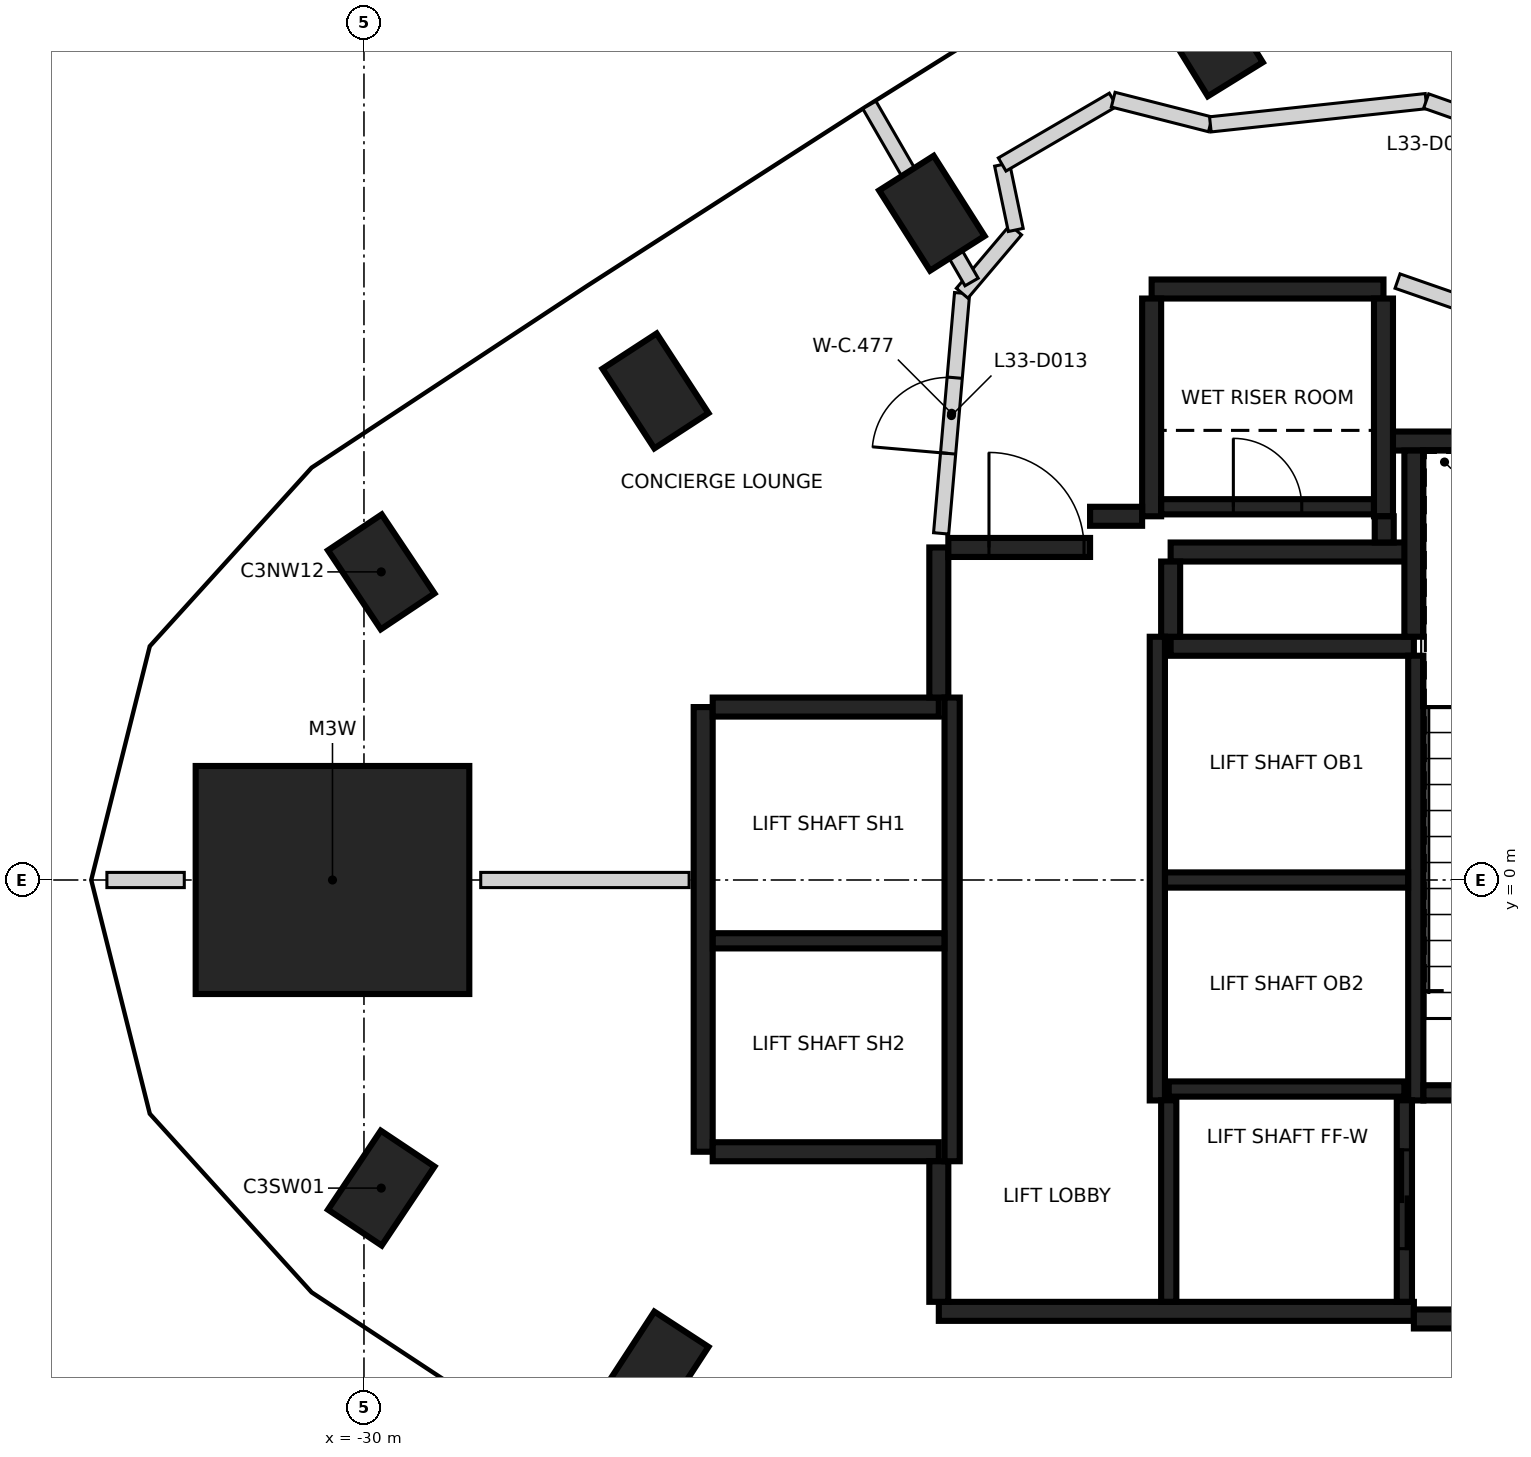
"""IFC4 building model, lengths in metres.
Left out: names, types, materials, properties, quantities, classifications, styles, units other than length and angle.
Written with IfcOpenShell. Run it as: python <this file> out.ifc"""

import sys

from ifc_helpers import new_model, si_unit, direction, frame, frame_2d, origin, origin_2d, place, context, subcontext, project, spatial, rectangle, extrude, element, fill, save


model = new_model("IFC4")
c1 = context("Model", 3, precision=1e-05, world=origin(), true_north=direction((0.0, 1.0)))
c2 = subcontext(c1, "Body", "Model", "MODEL_VIEW")
j1 = project(units=[si_unit("LENGTHUNIT", "METRE"), si_unit("PLANEANGLEUNIT", "RADIAN")], contexts=[c1])
p1 = place(None, origin())
s1 = spatial("IfcSite", under=j1, at=p1, CompositionType="ELEMENT")
p2 = place(p1, origin())
s2 = spatial("IfcBuilding", under=s1, at=p2, CompositionType="ELEMENT")
p3 = place(p2, frame((0.0, 0.0, 136.0)))
s3 = spatial("IfcBuildingStorey", under=s2, at=p3, CompositionType="ELEMENT", Elevation=136.0)
for number, where, z_axis, x_axis in (
    (1, (-18.865, 11.066, -0.4), (0.0, 0.0, 1.0), (-0.526, 0.851, 0.0)),
    (2, (-22.529, 8.772, -0.4), (0.0, 0.0, 1.0), (-0.536, 0.844, 0.0)),
    (3, (-26.165, 6.434, -0.4), (0.0, 0.0, 1.0), (-0.546, 0.838, 0.0)),
    (4, (-29.773, 4.053, -0.4), (0.0, 0.0, 1.0), (-0.556, 0.831, 0.0)),
    (5, (-29.773, -4.053, -0.4), (0.0, 0.0, 1.0), (0.556, 0.831, 0.0)),
    (6, (-26.165, -6.434, -0.4), (0.0, 0.0, 1.0), (0.546, 0.838, 0.0)),
):
    element("IfcColumn", number, at=place(p3, frame(where, z_axis=z_axis, x_axis=x_axis)), inside=s3, PredefinedType="COLUMN", context=c2, shape_type="SweptSolid", body=[
        extrude(rectangle(XDim=1.25, YDim=0.85, at=origin_2d()), origin(), (0.0, 0.0, 1.0), 3.6),
    ])
p4 = place(p3, frame((-30.414, 0.0, -0.4), z_axis=(0.0, 0.0, 1.0), x_axis=(1.0, 0.0, 0.0)))
e7 = element("IfcColumn", 7, at=p4, inside=s3, PredefinedType="COLUMN", context=c2, shape_type="SweptSolid", body=[
    extrude(rectangle(XDim=3.6, YDim=3.0, at=origin_2d()), origin(), (0.0, 0.0, 1.0), 3.6),
])
p5 = place(p3, frame((-16.187, -5.675, 0.0), z_axis=(0.0, 0.0, 1.0), x_axis=(-1.0, 0.0, 0.0)))
e8 = element("IfcWall", 8, at=p5, inside=s3, PredefinedType="SHEAR", context=c2, shape_type="SweptSolid", body=[
    extrude(rectangle(XDim=6.25, YDim=0.25, at=frame_2d((3.125, 0.0))), origin(), (0.0, 0.0, 1.0), 3.2),
])
p6 = place(p3, frame((-25.537, -3.575, 0.0), z_axis=(0.0, 0.0, 1.0), x_axis=(0.0, 1.0, 0.0)))
e9 = element("IfcWall", 9, at=p6, inside=s3, PredefinedType="SHEAR", context=c2, shape_type="SweptSolid", body=[
    extrude(rectangle(XDim=5.85, YDim=0.25, at=frame_2d((2.925, 0.0))), origin(), (0.0, 0.0, 1.0), 3.2),
])
p7 = place(p3, frame((-10.963, -5.775, 0.0), z_axis=(0.0, 0.0, 1.0), x_axis=(-1.0, 0.0, 0.0)))
e10 = element("IfcWall", 10, at=p7, inside=s3, PredefinedType="SHEAR", context=c2, shape_type="SweptSolid", body=[
    extrude(rectangle(XDim=5.225, YDim=0.25, at=frame_2d((2.612, 0.0))), origin(), (0.0, 0.0, 1.0), 3.2),
])
p8 = place(p3, frame((-16.472, 5.775, 0.0), z_axis=(0.0, 0.0, 1.0), x_axis=(1.0, 0.0, 0.0)))
e11 = element("IfcWall", 11, at=p8, inside=s3, PredefinedType="SHEAR", context=c2, shape_type="SweptSolid", body=[
    extrude(rectangle(XDim=5.51, YDim=0.25, at=frame_2d((2.755, 0.0))), origin(), (0.0, 0.0, 1.0), 3.2),
])
p9 = place(p3, frame((-19.387, 3.075, 0.0), z_axis=(0.0, 0.0, 1.0), x_axis=(1.0, 0.0, 0.0)))
e12 = element("IfcWall", 12, at=p9, inside=s3, PredefinedType="SHEAR", context=c2, shape_type="SweptSolid", body=[
    extrude(rectangle(XDim=3.2, YDim=0.25, at=frame_2d((1.6, 0.0))), origin(), (0.0, 0.0, 1.0), 3.2),
])
for number, where, z_axis, x_axis in (
    (13, (-22.437, -3.575, 0.0), (0.0, 0.0, 1.0), (-1.0, 0.0, 0.0)),
    (14, (-25.412, 2.275, 0.0), (0.0, 0.0, 1.0), (1.0, 0.0, 0.0)),
):
    element("IfcWall", number, at=place(p3, frame(where, z_axis=z_axis, x_axis=x_axis)), inside=s3, PredefinedType="SHEAR", context=c2, shape_type="SweptSolid", body=[
        extrude(rectangle(XDim=2.975, YDim=0.25, at=frame_2d((1.487, 0.0))), origin(), (0.0, 0.0, 1.0), 3.2),
    ])
p10 = place(p3, frame((-19.637, 7.775, 0.0), z_axis=(0.0, 0.0, 1.0), x_axis=(1.0, 0.0, 0.0)))
e15 = element("IfcWall", 15, at=p10, inside=s3, PredefinedType="SHEAR", context=c2, shape_type="SweptSolid", body=[
    extrude(rectangle(XDim=3.05, YDim=0.25, at=frame_2d((1.525, 0.0))), origin(), (0.0, 0.0, 1.0), 3.2),
])
for number, where, z_axis, x_axis in (
    (16, (-16.587, 7.65, 0.0), (0.0, 0.0, 1.0), (0.0, -1.0, 0.0)),
    (17, (-19.637, 4.785, 0.0), (0.0, 0.0, 1.0), (0.0, 1.0, 0.0)),
):
    element("IfcWall", number, at=place(p3, frame(where, z_axis=z_axis, x_axis=x_axis)), inside=s3, PredefinedType="SHEAR", context=c2, shape_type="SweptSolid", body=[
        extrude(rectangle(XDim=2.865, YDim=0.25, at=frame_2d((1.432, 0.0))), origin(), (0.0, 0.0, 1.0), 3.2),
    ])
p11 = place(p3, frame((-16.302, 4.315, 0.0), z_axis=(0.0, 0.0, 1.0), x_axis=(-1.0, 0.0, 0.0)))
e18 = element("IfcWall", 18, at=p11, inside=s3, PredefinedType="SHEAR", context=c2, shape_type="SweptSolid", body=[
    extrude(rectangle(XDim=3.085, YDim=0.25, at=frame_2d((1.542, 0.0))), origin(), (0.0, 0.0, 1.0), 3.2),
])
p12 = place(p3, frame((-16.187, 3.2, 0.0), z_axis=(0.0, 0.0, 1.0), x_axis=(0.0, 1.0, 0.0)))
e19 = element("IfcWall", 19, at=p12, inside=s3, PredefinedType="SHEAR", context=c2, shape_type="SweptSolid", body=[
    extrude(rectangle(XDim=2.449, YDim=0.25, at=frame_2d((1.225, 0.0))), origin(), (0.0, 0.0, 1.0), 3.2),
])
p13 = place(p3, frame((-22.437, 2.4, 0.0), z_axis=(0.0, 0.0, 1.0), x_axis=(0.0, 1.0, 0.0)))
e20 = element("IfcWall", 20, at=p13, inside=s3, PredefinedType="SHEAR", context=c2, shape_type="SweptSolid", body=[
    extrude(rectangle(XDim=1.975, YDim=0.25, at=frame_2d((0.987, 0.0))), origin(), (0.0, 0.0, 1.0), 3.2),
])
p14 = place(p3, frame((-22.437, -5.55, 0.0), z_axis=(0.0, 0.0, 1.0), x_axis=(0.0, 1.0, 0.0)))
e21 = element("IfcWall", 21, at=p14, inside=s3, PredefinedType="SHEAR", context=c2, shape_type="SweptSolid", body=[
    extrude(rectangle(XDim=1.849, YDim=0.25, at=frame_2d((0.925, 0.0))), origin(), (0.0, 0.0, 1.0), 3.2),
])
p15 = place(p3, frame((-22.312, 4.375, 0.0), z_axis=(0.0, 0.0, 1.0), x_axis=(1.0, 0.0, 0.0)))
e22 = element("IfcWall", 22, at=p15, inside=s3, PredefinedType="SHEAR", context=c2, shape_type="SweptSolid", body=[
    extrude(rectangle(XDim=1.865, YDim=0.25, at=frame_2d((0.932, 0.0))), origin(), (0.0, 0.0, 1.0), 3.2),
])
p16 = place(p15, frame((0.535, 0.0, 0.0)))
e23 = element("IfcOpeningElement", 23, at=p16, cuts=e22, PredefinedType="OPENING", context=c2, shape_type="SweptSolid", body=[
    extrude(rectangle(XDim=1.25, YDim=2.1, at=frame_2d((0.625, 1.05))), frame((0.0, 0.135, 0.0), z_axis=(0.0, -1.0, 0.0), x_axis=(1.0, 0.0, 0.0)), (0.0, 0.0, 1.0), 0.27),
])
p17 = place(p3, frame((-19.387, 4.19, 0.0), z_axis=(0.0, 0.0, 1.0), x_axis=(0.0, -1.0, 0.0)))
e24 = element("IfcWall", 24, at=p17, inside=s3, PredefinedType="SHEAR", context=c2, shape_type="SweptSolid", body=[
    extrude(rectangle(XDim=0.989, YDim=0.25, at=frame_2d((0.495, 0.0))), origin(), (0.0, 0.0, 1.0), 3.2),
])
p18 = place(p3, frame((-20.447, 4.785, 0.0), z_axis=(0.0, 0.0, 1.0), x_axis=(1.0, 0.0, 0.0)))
e25 = element("IfcWall", 25, at=p18, inside=s3, PredefinedType="SHEAR", context=c2, shape_type="SweptSolid", body=[
    extrude(rectangle(XDim=0.685, YDim=0.25, at=frame_2d((0.342, 0.0))), origin(), (0.0, 0.0, 1.0), 3.2),
])
p19 = place(p3, frame((-16.577, 4.785, 0.0), z_axis=(0.0, 0.0, 1.0), x_axis=(0.0, -1.0, 0.0)))
e26 = element("IfcWall", 26, at=p19, inside=s3, PredefinedType="SHEAR", context=c2, shape_type="SweptSolid", body=[
    extrude(rectangle(XDim=0.344, YDim=0.25, at=frame_2d((0.172, 0.0))), origin(), (0.0, 0.0, 1.0), 3.2),
])
p20 = place(p3, frame((-16.162, 2.951, 0.0), z_axis=(0.0, 0.0, 1.0), x_axis=(0.0, -1.0, 0.0)))
e27 = element("IfcWall", 27, at=p20, inside=s3, PredefinedType="SHEAR", context=c2, shape_type="SweptSolid", body=[
    extrude(rectangle(XDim=5.851, YDim=0.2, at=frame_2d((2.925, 0.0))), origin(), (0.0, 0.0, 1.0), 3.2),
])
for number, where, z_axis, x_axis in (
    (28, (-19.562, -2.9, 0.0), (0.0, 0.0, 1.0), (0.0, 1.0, 0.0)),
    (29, (-22.262, 2.4, 0.0), (0.0, 0.0, 1.0), (0.0, -1.0, 0.0)),
):
    element("IfcWall", number, at=place(p3, frame(where, z_axis=z_axis, x_axis=x_axis)), inside=s3, PredefinedType="SHEAR", context=c2, shape_type="SweptSolid", body=[
        extrude(rectangle(XDim=6.1, YDim=0.2, at=frame_2d((3.05, 0.0))), origin(), (0.0, 0.0, 1.0), 3.2),
    ])
p21 = place(p3, frame((-10.963, -2.8, 0.0), z_axis=(0.0, 0.0, 1.0), x_axis=(-1.0, 0.0, 0.0)))
e30 = element("IfcWall", 30, at=p21, inside=s3, PredefinedType="SHEAR", context=c2, shape_type="SweptSolid", body=[
    extrude(rectangle(XDim=5.098, YDim=0.2, at=frame_2d((2.549, 0.0))), origin(), (0.0, 0.0, 1.0), 3.2),
])
p22 = place(p21, frame((1.774, 0.0, 0.0)))
e31 = element("IfcOpeningElement", 31, at=p22, cuts=e30, PredefinedType="OPENING", context=c2, shape_type="SweptSolid", body=[
    extrude(rectangle(XDim=1.4, YDim=2.1, at=frame_2d((0.7, 1.05))), frame((0.0, 0.11, 0.0), z_axis=(0.0, -1.0, 0.0), x_axis=(1.0, 0.0, 0.0)), (0.0, 0.0, 1.0), 0.22),
])
p23 = place(p3, frame((-16.263, 0.0, 0.0), z_axis=(0.0, 0.0, 1.0), x_axis=(-1.0, 0.0, 0.0)))
e32 = element("IfcWall", 32, at=p23, inside=s3, PredefinedType="SHEAR", context=c2, shape_type="SweptSolid", body=[
    extrude(rectangle(XDim=3.198, YDim=0.2, at=frame_2d((1.599, 0.0))), origin(), (0.0, 0.0, 1.0), 3.2),
])
p24 = place(p3, frame((-22.363, -0.8, 0.0), z_axis=(0.0, 0.0, 1.0), x_axis=(-1.0, 0.0, 0.0)))
e33 = element("IfcWall", 33, at=p24, inside=s3, PredefinedType="SHEAR", context=c2, shape_type="SweptSolid", body=[
    extrude(rectangle(XDim=3.048, YDim=0.2, at=frame_2d((1.524, 0.0))), origin(), (0.0, 0.0, 1.0), 3.2),
])
p25 = place(p3, frame((-19.511, 4.91, 0.0), z_axis=(0.0, 0.0, 1.0), x_axis=(1.0, 0.0, 0.0)))
e34 = element("IfcWall", 34, at=p25, inside=s3, PredefinedType="SHEAR", context=c2, shape_type="SweptSolid", body=[
    extrude(rectangle(XDim=2.798, YDim=0.2, at=frame_2d((1.399, 0.0))), origin(), (0.0, 0.0, 1.0), 3.2),
])
p26 = place(p25, frame((0.949, 0.0, 0.0)))
e35 = element("IfcOpeningElement", 35, at=p26, cuts=e34, PredefinedType="OPENING", context=c2, shape_type="SweptSolid", body=[
    extrude(rectangle(XDim=0.9, YDim=2.1, at=frame_2d((0.45, 1.05))), frame((0.0, 0.11, 0.0), z_axis=(0.0, -1.0, 0.0), x_axis=(1.0, 0.0, 0.0)), (0.0, 0.0, 1.0), 0.22),
])
p27 = place(p3, frame((-19.412, -2.75, 0.0), z_axis=(0.0, 0.0, 1.0), x_axis=(1.0, 0.0, 0.0)))
e36 = element("IfcWall", 36, at=p27, inside=s3, PredefinedType="SHEAR", context=c2, shape_type="SweptSolid", body=[
    extrude(rectangle(XDim=3.1, YDim=0.2, at=frame_2d((1.55, 0.0))), origin(), (0.0, 0.0, 1.0), 3.2),
])
p28 = place(p3, frame((-16.312, -2.898, 0.0), z_axis=(0.0, 0.0, 1.0), x_axis=(0.0, -1.0, 0.0)))
e37 = element("IfcWall", 37, at=p28, inside=s3, PredefinedType="SHEAR", context=c2, shape_type="SweptSolid", body=[
    extrude(rectangle(XDim=2.651, YDim=0.2, at=frame_2d((1.325, 0.0))), origin(), (0.0, 0.0, 1.0), 3.2),
])
p29 = place(p28, frame((0.652, 0.0, 0.0)))
e38 = element("IfcOpeningElement", 38, at=p29, cuts=e37, PredefinedType="OPENING", context=c2, shape_type="SweptSolid", body=[
    extrude(rectangle(XDim=1.3, YDim=2.1, at=frame_2d((0.65, 1.05))), frame((0.0, 0.11, 0.0), z_axis=(0.0, -1.0, 0.0), x_axis=(1.0, 0.0, 0.0)), (0.0, 0.0, 1.0), 0.22),
])
p30 = place(p3, frame((-19.412, -5.549, 0.0), z_axis=(0.0, 0.0, 1.0), x_axis=(0.0, 1.0, 0.0)))
e39 = element("IfcWall", 39, at=p30, inside=s3, PredefinedType="SHEAR", context=c2, shape_type="SweptSolid", body=[
    extrude(rectangle(XDim=2.651, YDim=0.2, at=frame_2d((1.325, 0.0))), origin(), (0.0, 0.0, 1.0), 3.2),
])
p31 = place(p3, frame((-22.407, 4.56, 0.0), z_axis=(0.0, 0.0, 1.0), x_axis=(0.086898645684, 0.996217157741, 0.0)))
e40 = element("IfcWall", 40, at=p31, inside=s3, PredefinedType="PARTITIONING", context=c2, shape_type="SweptSolid", body=[
    extrude(rectangle(XDim=3.172, YDim=0.2, at=frame_2d((1.586, 0.0))), origin(), (0.0, 0.0, 1.0), 3.2),
])
p32 = place(p31, frame((1.056, 0.0, 0.0)))
e41 = element("IfcOpeningElement", 41, at=p32, cuts=e40, PredefinedType="OPENING", context=c2, shape_type="SweptSolid", body=[
    extrude(rectangle(XDim=1.0, YDim=2.1, at=frame_2d((0.5, 1.05))), frame((0.0, 0.11, 0.0), z_axis=(0.0, -1.0, 0.0), x_axis=(1.0, 0.0, 0.0)), (0.0, 0.0, 1.0), 0.22),
])
p33 = place(p3, frame((-22.13, 7.719, 0.0), z_axis=(0.0, 0.0, 1.0), x_axis=(0.646413536249, 0.762987247701, 0.0)))
e42 = element("IfcWall", 42, at=p33, inside=s3, PredefinedType="PARTITIONING", context=c2, shape_type="SweptSolid", body=[
    extrude(rectangle(XDim=1.091, YDim=0.2, at=frame_2d((0.545, 0.0))), origin(), (0.0, 0.0, 1.0), 3.2),
])
p34 = place(p3, frame((-21.605, 9.412, 0.0), z_axis=(0.0, 0.0, 1.0), x_axis=(0.204764111512, -0.978811349871, 0.0)))
e43 = element("IfcWall", 43, at=p34, inside=s3, PredefinedType="PARTITIONING", context=c2, shape_type="SweptSolid", body=[
    extrude(rectangle(XDim=0.879, YDim=0.2, at=frame_2d((0.439, 0.0))), origin(), (0.0, 0.0, 1.0), 2.3),
])
p35 = place(p3, frame((-21.604, 9.413, 0.0), z_axis=(0.0, 0.0, 1.0), x_axis=(0.863736988548, 0.503942868402, 0.0)))
e44 = element("IfcWall", 44, at=p35, inside=s3, PredefinedType="PARTITIONING", context=c2, shape_type="SweptSolid", body=[
    extrude(rectangle(XDim=1.69, YDim=0.2, at=frame_2d((0.845, 0.0))), origin(), (0.0, 0.0, 1.0), 2.3),
])
p36 = place(p3, frame((-20.143, 10.266, 0.0), z_axis=(0.0, 0.0, 1.0), x_axis=(0.969121308325, -0.246584447505, 0.0)))
e45 = element("IfcWall", 45, at=p36, inside=s3, PredefinedType="PARTITIONING", context=c2, shape_type="SweptSolid", body=[
    extrude(rectangle(XDim=1.319, YDim=0.2, at=frame_2d((0.659, 0.0))), origin(), (0.0, 0.0, 1.0), 2.3),
])
p37 = place(p3, frame((-18.865, 9.941, 0.0), z_axis=(0.0, 0.0, 1.0), x_axis=(0.99423123086, 0.107257911519, 0.0)))
e46 = element("IfcWall", 46, at=p37, inside=s3, PredefinedType="PARTITIONING", context=c2, shape_type="SweptSolid", body=[
    extrude(rectangle(XDim=2.854, YDim=0.2, at=frame_2d((1.427, 0.0))), origin(), (0.0, 0.0, 1.0), 3.2),
])
p38 = place(p3, frame((-16.402, 7.879, 0.0), z_axis=(0.0, 0.0, 1.0), x_axis=(0.944492255471, -0.328533680702, 0.0)))
e47 = element("IfcWall", 47, at=p38, inside=s3, PredefinedType="PARTITIONING", context=c2, shape_type="SweptSolid", body=[
    extrude(rectangle(XDim=5.802, YDim=0.2, at=frame_2d((2.901, 0.0))), origin(), (0.0, 0.0, 1.0), 3.2),
])
p39 = place(p38, frame((2.37, 0.0, 0.0)))
e48 = element("IfcOpeningElement", 48, at=p39, cuts=e47, PredefinedType="OPENING", context=c2, shape_type="SweptSolid", body=[
    extrude(rectangle(XDim=1.0, YDim=2.1, at=frame_2d((0.5, 1.05))), frame((0.0, 0.11, 0.0), z_axis=(0.0, -1.0, 0.0), x_axis=(1.0, 0.0, 0.0)), (0.0, 0.0, 1.0), 0.22),
])
p40 = place(p3, frame((-16.026, 10.248, 0.0), z_axis=(0.0, 0.0, 1.0), x_axis=(0.943234993827, -0.332126100179, 0.0)))
e49 = element("IfcWall", 49, at=p40, inside=s3, PredefinedType="PARTITIONING", context=c2, shape_type="SweptSolid", body=[
    extrude(rectangle(XDim=6.239, YDim=0.2, at=frame_2d((3.119, 0.0))), origin(), (0.0, 0.0, 1.0), 3.2),
])
p41 = place(p40, frame((4.355, 0.0, 0.0)))
e50 = element("IfcOpeningElement", 50, at=p41, cuts=e49, PredefinedType="OPENING", context=c2, shape_type="SweptSolid", body=[
    extrude(rectangle(XDim=1.0, YDim=2.1, at=frame_2d((0.5, 1.05))), frame((0.0, 0.11, 0.0), z_axis=(0.0, -1.0, 0.0), x_axis=(1.0, 0.0, 0.0)), (0.0, 0.0, 1.0), 0.22),
])
p42 = place(p40, frame((1.251, 0.0, 0.0)))
e51 = element("IfcOpeningElement", 51, at=p42, cuts=e49, PredefinedType="OPENING", context=c2, shape_type="SweptSolid", body=[
    extrude(rectangle(XDim=1.0, YDim=2.1, at=frame_2d((0.5, 1.05))), frame((0.0, 0.11, 0.0), z_axis=(0.0, -1.0, 0.0), x_axis=(1.0, 0.0, 0.0)), (0.0, 0.0, 1.0), 0.22),
])
p43 = place(p3, frame((-33.382, 0.0, 0.0), z_axis=(0.0, 0.0, 1.0), x_axis=(1.0, 0.0, 0.0)))
e52 = element("IfcWall", 52, at=p43, inside=s3, PredefinedType="PARTITIONING", context=c2, shape_type="SweptSolid", body=[
    extrude(rectangle(XDim=1.018, YDim=0.2, at=frame_2d((0.509, 0.0))), origin(), (0.0, 0.0, 1.0), 3.2),
])
p44 = place(p3, frame((-28.464, 0.0, 0.0), z_axis=(0.0, 0.0, 1.0), x_axis=(1.0, 0.0, 0.0)))
e53 = element("IfcWall", 53, at=p44, inside=s3, PredefinedType="PARTITIONING", context=c2, shape_type="SweptSolid", body=[
    extrude(rectangle(XDim=2.742, YDim=0.2, at=frame_2d((1.371, 0.0))), origin(), (0.0, 0.0, 1.0), 3.2),
])
p45 = place(p3, frame((-23.351, 10.197, 0.0), z_axis=(0.0, 0.0, 1.0), x_axis=(0.49992673358, -0.86606770004, 0.0)))
e54 = element("IfcWall", 54, at=p45, inside=s3, PredefinedType="PARTITIONING", context=c2, shape_type="SweptSolid", body=[
    extrude(rectangle(XDim=2.69, YDim=0.2, at=frame_2d((1.345, 0.0))), origin(), (0.0, 0.0, 1.0), 3.2),
])
p46 = place(p3, frame((-15.996, 14.74, 0.0), z_axis=(0.0, 0.0, 1.0), x_axis=(0.499925398456, -0.866068470722, 0.0)))
e55 = element("IfcWall", 55, at=p46, inside=s3, PredefinedType="PARTITIONING", context=c2, shape_type="SweptSolid", body=[
    extrude(rectangle(XDim=6.526, YDim=0.2, at=frame_2d((3.263, 0.0))), origin(), (0.0, 0.0, 1.0), 3.2),
])
p47 = place(p29, origin())
e56 = element("IfcDoor", 56, at=p47, inside=s3, OperationType="SLIDING_TO_LEFT", PredefinedType="DOOR", context=c2, shape_type="SweptSolid", body=[
    extrude(rectangle(XDim=1.3, YDim=2.1, at=frame_2d((0.65, 1.05))), frame((0.0, 0.025, 0.0), z_axis=(0.0, -1.0, 0.0), x_axis=(1.0, 0.0, 0.0)), (0.0, 0.0, 1.0), 0.05),
])
fill(e38, e56)
p48 = place(p16, origin())
e57 = element("IfcDoor", 57, at=p48, inside=s3, OperationType="SINGLE_SWING_LEFT", PredefinedType="DOOR", context=c2, shape_type="SweptSolid", body=[
    extrude(rectangle(XDim=1.25, YDim=2.1, at=frame_2d((0.625, 1.05))), frame((0.0, 0.025, 0.0), z_axis=(0.0, -1.0, 0.0), x_axis=(1.0, 0.0, 0.0)), (0.0, 0.0, 1.0), 0.05),
])
fill(e23, e57)
p49 = place(p26, origin())
e58 = element("IfcDoor", 58, at=p49, inside=s3, OperationType="SINGLE_SWING_RIGHT", PredefinedType="DOOR", context=c2, shape_type="SweptSolid", body=[
    extrude(rectangle(XDim=0.9, YDim=2.1, at=frame_2d((0.45, 1.05))), frame((0.0, 0.025, 0.0), z_axis=(0.0, -1.0, 0.0), x_axis=(1.0, 0.0, 0.0)), (0.0, 0.0, 1.0), 0.05),
])
fill(e35, e58)
p50 = place(p32, origin())
e59 = element("IfcDoor", 59, at=p50, inside=s3, OperationType="SINGLE_SWING_LEFT", PredefinedType="DOOR", context=c2, shape_type="SweptSolid", body=[
    extrude(rectangle(XDim=1.0, YDim=2.1, at=frame_2d((0.5, 1.05))), frame((0.0, 0.025, 0.0), z_axis=(0.0, -1.0, 0.0), x_axis=(1.0, 0.0, 0.0)), (0.0, 0.0, 1.0), 0.05),
])
fill(e41, e59)
save(model, sys.argv[1])
